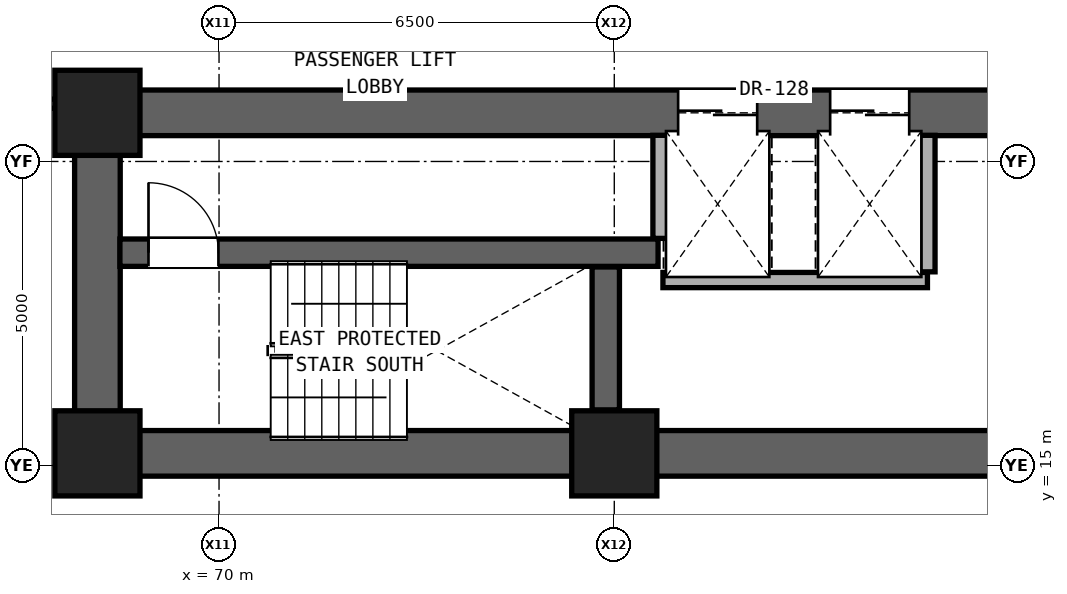
"""IFC4 building model, lengths in metres.
Left out: names, types, materials, properties, quantities, classifications, styles, units other than length and angle.
Written with IfcOpenShell. Run it as: python <this file> out.ifc"""

import sys

from ifc_helpers import new_model, si_unit, direction, frame, frame_2d, origin, origin_2d, place, context, subcontext, project, spatial, rectangle, extrude, element, fill, save


model = new_model("IFC4")
c1 = context("Model", 3, precision=1e-05, world=origin(), true_north=direction((0.0, 1.0)))
c2 = subcontext(c1, "Body", "Model", "MODEL_VIEW")
j1 = project(units=[si_unit("LENGTHUNIT", "METRE"), si_unit("PLANEANGLEUNIT", "RADIAN")], contexts=[c1])
p1 = place(None, origin())
s1 = spatial("IfcSite", under=j1, at=p1, CompositionType="ELEMENT")
p2 = place(p1, origin())
s2 = spatial("IfcBuilding", under=s1, at=p2, CompositionType="ELEMENT")
p3 = place(p2, frame((0.0, 0.0, 32.3)))
s3 = spatial("IfcBuildingStorey", under=s2, at=p3, CompositionType="ELEMENT", Elevation=32.3)
for number, where, z_axis, x_axis in (
    (1, (68.0, 15.2, 0.0), (0.0, 0.0, 1.0), (1.0, 0.0, 0.0)),
    (2, (76.5, 15.2, 0.0), (0.0, 0.0, 1.0), (1.0, 0.0, 0.0)),
    (3, (68.0, 20.8, 0.0), (0.0, 0.0, 1.0), (1.0, 0.0, 0.0)),
):
    element("IfcColumn", number, at=place(p3, frame(where, z_axis=z_axis, x_axis=x_axis)), inside=s3, PredefinedType="COLUMN", context=c2, shape_type="SweptSolid", body=[
        extrude(rectangle(XDim=1.4, YDim=1.4, at=origin_2d()), origin(), (0.0, 0.0, 1.0), 3.3),
    ])
p4 = place(p3, frame((68.0, 15.2, 0.0), z_axis=(0.0, 0.0, 1.0), x_axis=(1.0, 0.0, 0.0)))
e4 = element("IfcWall", 4, at=p4, inside=s3, PredefinedType="SHEAR", context=c2, shape_type="SweptSolid", body=[
    extrude(rectangle(XDim=17.0, YDim=0.75, at=frame_2d((8.5, 0.0))), origin(), (0.0, 0.0, 1.0), 3.06),
])
p5 = place(p3, frame((68.0, 15.2, 0.0), z_axis=(0.0, 0.0, 1.0), x_axis=(0.0, 1.0, 0.0)))
e5 = element("IfcWall", 5, at=p5, inside=s3, PredefinedType="SHEAR", context=c2, shape_type="SweptSolid", body=[
    extrude(rectangle(XDim=5.6, YDim=0.75, at=frame_2d((2.8, 0.0))), origin(), (0.0, 0.0, 1.0), 3.06),
])
p6 = place(p3, frame((68.0, 20.8, 0.0), z_axis=(0.0, 0.0, 1.0), x_axis=(1.0, 0.0, 0.0)))
e6 = element("IfcWall", 6, at=p6, inside=s3, PredefinedType="SHEAR", context=c2, shape_type="SweptSolid", body=[
    extrude(rectangle(XDim=17.0, YDim=0.75, at=frame_2d((8.5, 0.0))), origin(), (0.0, 0.0, 1.0), 3.06),
])
p7 = place(p6, frame((9.55, 0.0, 0.0)))
e7 = element("IfcOpeningElement", 7, at=p7, cuts=e6, PredefinedType="OPENING", context=c2, shape_type="SweptSolid", body=[
    extrude(rectangle(XDim=1.3, YDim=2.3, at=frame_2d((0.65, 1.15))), frame((0.0, 0.385, 0.0), z_axis=(0.0, -1.0, 0.0), x_axis=(1.0, 0.0, 0.0)), (0.0, 0.0, 1.0), 0.77),
])
p8 = place(p6, frame((12.05, 0.0, 0.0)))
e8 = element("IfcOpeningElement", 8, at=p8, cuts=e6, PredefinedType="OPENING", context=c2, shape_type="SweptSolid", body=[
    extrude(rectangle(XDim=1.3, YDim=2.3, at=frame_2d((0.65, 1.15))), frame((0.0, 0.385, 0.0), z_axis=(0.0, -1.0, 0.0), x_axis=(1.0, 0.0, 0.0)), (0.0, 0.0, 1.0), 0.77),
])
p9 = place(p3, frame((77.3, 18.05, 0.0), z_axis=(0.0, 0.0, 1.0), x_axis=(1.0, 0.0, 0.0)))
e9 = element("IfcWall", 9, at=p9, inside=s3, PredefinedType="SOLIDWALL", context=c2, shape_type="SweptSolid", body=[
    extrude(rectangle(XDim=4.35, YDim=0.25, at=frame_2d((2.175, 0.0))), origin(), (0.0, 0.0, 1.0), 3.06),
])
p10 = place(p3, frame((68.37, 18.5, 0.0), z_axis=(0.0, 0.0, 1.0), x_axis=(1.0, 0.0, 0.0)))
e10 = element("IfcWall", 10, at=p10, inside=s3, PredefinedType="SHEAR", context=c2, shape_type="SweptSolid", body=[
    extrude(rectangle(XDim=8.85, YDim=0.45, at=frame_2d((4.425, 0.0))), origin(), (0.0, 0.0, 1.0), 3.06),
])
p11 = place(p10, frame((0.47, 0.0, 0.0)))
e11 = element("IfcOpeningElement", 11, at=p11, cuts=e10, PredefinedType="OPENING", context=c2, shape_type="SweptSolid", body=[
    extrude(rectangle(XDim=1.15, YDim=2.2, at=frame_2d((0.575, 1.1))), frame((0.0, 0.235, 0.0), z_axis=(0.0, -1.0, 0.0), x_axis=(1.0, 0.0, 0.0)), (0.0, 0.0, 1.0), 0.47),
])
p12 = place(p3, frame((66.62, 20.95, 0.0), z_axis=(0.0, 0.0, 1.0), x_axis=(1.0, 0.0, 0.0)))
e12 = element("IfcWall", 12, at=p12, inside=s3, PredefinedType="PARTITIONING", context=c2, shape_type="SweptSolid", body=[
    extrude(rectangle(XDim=1.01, YDim=0.15, at=frame_2d((0.505, 0.0))), origin(), (0.0, 0.0, 1.0), 2.452),
])
p13 = place(p3, frame((76.36, 15.915, 0.0), z_axis=(0.0, 0.0, 1.0), x_axis=(0.0, 1.0, 0.0)))
e13 = element("IfcWall", 13, at=p13, inside=s3, PredefinedType="SHEAR", context=c2, shape_type="SweptSolid", body=[
    extrude(rectangle(XDim=2.35, YDim=0.45, at=frame_2d((1.175, 0.0))), origin(), (0.0, 0.0, 1.0), 3.06),
])
p14 = place(p3, frame((77.26, 18.735, 0.0), z_axis=(0.0, 0.0, 1.0), x_axis=(0.0, 1.0, 0.0)))
e14 = element("IfcWall", 14, at=p14, inside=s3, PredefinedType="SOLIDWALL", context=c2, shape_type="SweptSolid", body=[
    extrude(rectangle(XDim=1.695, YDim=0.25, at=frame_2d((0.847, 0.0))), origin(), (0.0, 0.0, 1.0), 3.06),
])
p15 = place(p3, frame((81.65, 18.185, 0.0), z_axis=(0.0, 0.0, 1.0), x_axis=(0.0, 1.0, 0.0)))
e15 = element("IfcWall", 15, at=p15, inside=s3, PredefinedType="SOLIDWALL", context=c2, shape_type="SweptSolid", body=[
    extrude(rectangle(XDim=2.245, YDim=0.25, at=frame_2d((1.123, 0.0))), origin(), (0.0, 0.0, 1.0), 3.06),
])
p16 = place(p11, origin())
e16 = element("IfcDoor", 16, at=p16, inside=s3, OperationType="SINGLE_SWING_LEFT", PredefinedType="DOOR", context=c2, shape_type="SweptSolid", body=[
    extrude(rectangle(XDim=1.15, YDim=2.2, at=frame_2d((0.575, 1.1))), frame((0.0, 0.025, 0.0), z_axis=(0.0, -1.0, 0.0), x_axis=(1.0, 0.0, 0.0)), (0.0, 0.0, 1.0), 0.05),
])
fill(e11, e16)
p17 = place(p7, origin())
e17 = element("IfcDoor", 17, at=p17, inside=s3, OperationType="DOUBLE_DOOR_SLIDING", PredefinedType="DOOR", context=c2, shape_type="SweptSolid", body=[
    extrude(rectangle(XDim=1.3, YDim=2.3, at=frame_2d((0.65, 1.15))), frame((0.0, 0.025, 0.0), z_axis=(0.0, -1.0, 0.0), x_axis=(1.0, 0.0, 0.0)), (0.0, 0.0, 1.0), 0.05),
])
fill(e7, e17)
p18 = place(p8, origin())
e18 = element("IfcDoor", 18, at=p18, inside=s3, OperationType="DOUBLE_DOOR_SLIDING", PredefinedType="DOOR", context=c2, shape_type="SweptSolid", body=[
    extrude(rectangle(XDim=1.3, YDim=2.3, at=frame_2d((0.65, 1.15))), frame((0.0, 0.025, 0.0), z_axis=(0.0, -1.0, 0.0), x_axis=(1.0, 0.0, 0.0)), (0.0, 0.0, 1.0), 0.05),
])
fill(e8, e18)
save(model, sys.argv[1])
